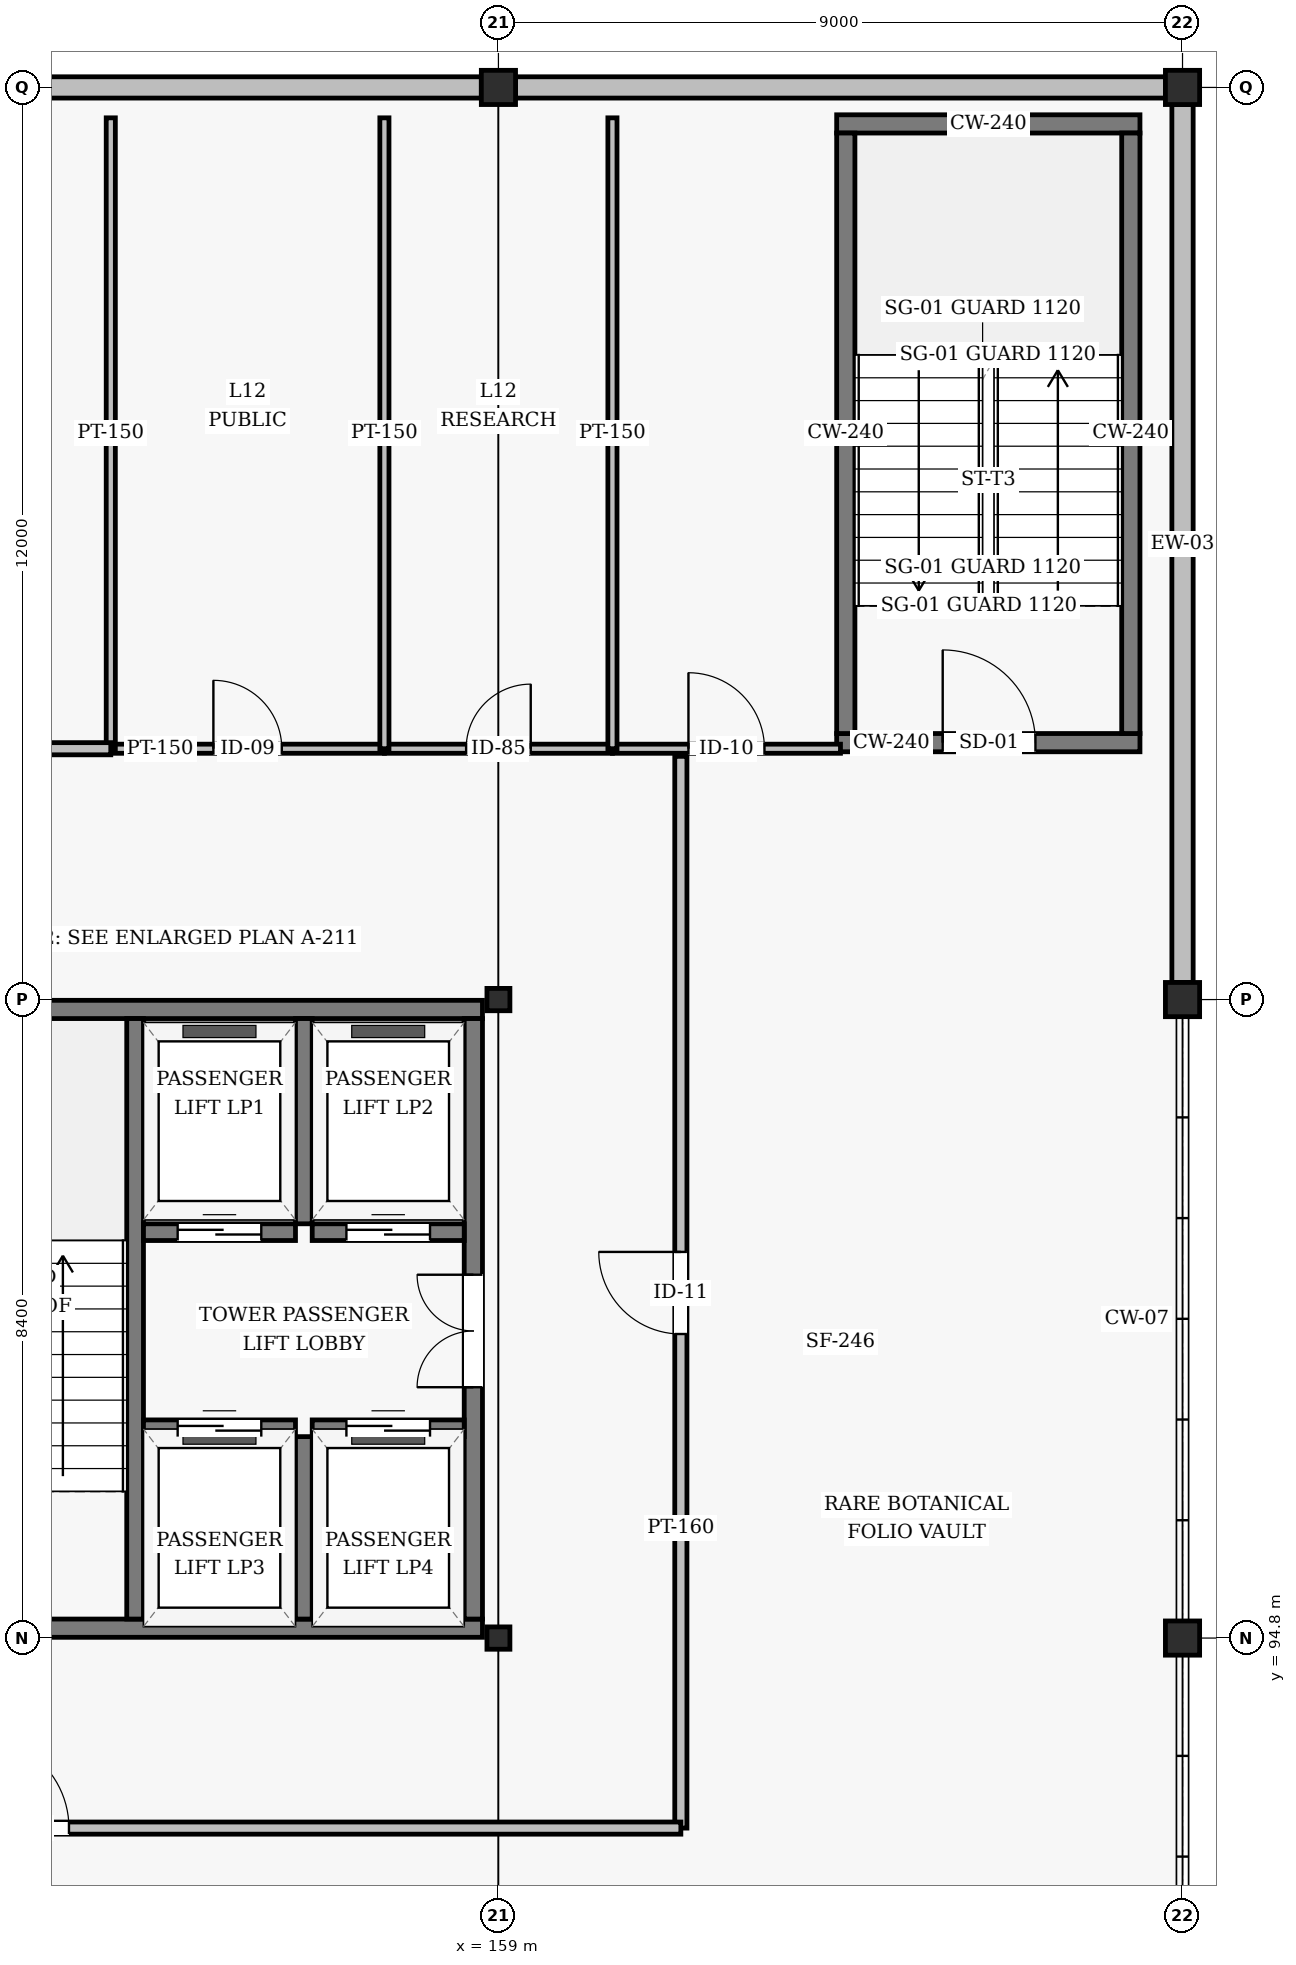
"""IFC4 building model, lengths in metres.
Left out: names, types, materials, properties, quantities, classifications, styles, units other than length and angle.
Written with IfcOpenShell. Run it as: python <this file> out.ifc"""

import sys

from ifc_helpers import new_model, si_unit, direction, frame, frame_2d, origin, origin_2d, place, context, subcontext, project, spatial, rectangle, hollow_rectangle, i_section, extrude, element, fill, save


model = new_model("IFC4")
c1 = context("Model", 3, precision=1e-05, world=origin(), true_north=direction((0.0, 1.0)))
c2 = subcontext(c1, "Body", "Model", "MODEL_VIEW")
j1 = project(units=[si_unit("LENGTHUNIT", "METRE"), si_unit("PLANEANGLEUNIT", "RADIAN")], contexts=[c1])
p1 = place(None, origin())
s1 = spatial("IfcSite", under=j1, at=p1, CompositionType="ELEMENT")
p2 = place(p1, origin())
s2 = spatial("IfcBuilding", under=s1, at=p2, CompositionType="ELEMENT")
p3 = place(p2, frame((0.0, 0.0, 46.8)))
s3 = spatial("IfcBuildingStorey", under=s2, at=p3, CompositionType="ELEMENT", Elevation=46.8)
for number, where, z_axis, x_axis in (
    (1, (159.0, 94.8, 0.0), (0.0, 0.0, 1.0), (1.0, 0.0, 0.0)),
    (2, (159.0, 103.2, 0.0), (0.0, 0.0, 1.0), (1.0, 0.0, 0.0)),
):
    element("IfcColumn", number, at=place(p3, frame(where, z_axis=z_axis, x_axis=x_axis)), inside=s3, PredefinedType="COLUMN", context=c2, shape_type="SweptSolid", body=[
        extrude(i_section(OverallWidth=0.302, OverallDepth=0.294, WebThickness=0.012, FlangeThickness=0.012, FilletRadius=0.018, at=origin_2d()), origin(), (0.0, 0.0, 1.0), 3.6),
    ])
for number, where, z_axis, x_axis in (
    (3, (159.0, 115.2, 0.0), (0.0, 0.0, 1.0), (1.0, 0.0, 0.0)),
    (4, (168.0, 94.8, 0.0), (0.0, 0.0, 1.0), (1.0, 0.0, 0.0)),
    (5, (168.0, 103.2, 0.0), (0.0, 0.0, 1.0), (1.0, 0.0, 0.0)),
    (6, (168.0, 115.2, 0.0), (0.0, 0.0, 1.0), (1.0, 0.0, 0.0)),
):
    element("IfcColumn", number, at=place(p3, frame(where, z_axis=z_axis, x_axis=x_axis)), inside=s3, PredefinedType="COLUMN", context=c2, shape_type="SweptSolid", body=[
        extrude(hollow_rectangle(XDim=0.45, YDim=0.45, WallThickness=0.018, InnerFilletRadius=0.018, OuterFilletRadius=0.036, at=origin_2d()), origin(), (0.0, 0.0, 1.0), 3.6),
    ])
p4 = place(p3, frame((168.0, 103.425, 0.0), z_axis=(0.0, 0.0, 1.0), x_axis=(0.0, 1.0, 0.0)))
e7 = element("IfcWall", 7, at=p4, inside=s3, PredefinedType="SOLIDWALL", context=c2, shape_type="SweptSolid", body=[
    extrude(rectangle(XDim=11.55, YDim=0.28, at=frame_2d((5.775, 0.0))), origin(), (0.0, 0.0, 1.0), 2.546),
])
for number, where, z_axis, x_axis in (
    (8, (167.775, 115.2, 0.0), (0.0, 0.0, 1.0), (-1.0, 0.0, 0.0)),
    (9, (158.775, 115.2, 0.0), (0.0, 0.0, 1.0), (-1.0, 0.0, 0.0)),
):
    element("IfcWall", number, at=place(p3, frame(where, z_axis=z_axis, x_axis=x_axis)), inside=s3, PredefinedType="SOLIDWALL", context=c2, shape_type="SweptSolid", body=[
        extrude(rectangle(XDim=8.55, YDim=0.28, at=frame_2d((4.275, 0.0))), origin(), (0.0, 0.0, 1.0), 2.546),
    ])
p5 = place(p3, frame((150.02, 94.93, 0.0), z_axis=(0.0, 0.0, 1.0), x_axis=(1.0, 0.0, 0.0)))
e10 = element("IfcWall", 10, at=p5, inside=s3, PredefinedType="SHEAR", context=c2, shape_type="SweptSolid", body=[
    extrude(rectangle(XDim=8.77, YDim=0.24, at=frame_2d((4.385, 0.0))), origin(), (0.0, 0.0, 1.0), 3.338),
])
p6 = place(p5, frame((1.79, 0.0, 0.0)))
e11 = element("IfcOpeningElement", 11, at=p6, cuts=e10, PredefinedType="OPENING", context=c2, shape_type="SweptSolid", body=[
    extrude(rectangle(XDim=1.22, YDim=2.18, at=frame_2d((0.61, 1.09))), frame((0.0, 0.13, 0.0), z_axis=(0.0, -1.0, 0.0), x_axis=(1.0, 0.0, 0.0)), (0.0, 0.0, 1.0), 0.26),
])
p7 = place(p3, frame((150.02, 103.07, 0.0), z_axis=(0.0, 0.0, 1.0), x_axis=(1.0, 0.0, 0.0)))
e12 = element("IfcWall", 12, at=p7, inside=s3, PredefinedType="SHEAR", context=c2, shape_type="SweptSolid", body=[
    extrude(rectangle(XDim=8.77, YDim=0.24, at=frame_2d((4.385, 0.0))), origin(), (0.0, 0.0, 1.0), 3.338),
])
p8 = place(p3, frame((154.22, 95.05, 0.0), z_axis=(0.0, 0.0, 1.0), x_axis=(0.0, 1.0, 0.0)))
e13 = element("IfcWall", 13, at=p8, inside=s3, PredefinedType="SHEAR", context=c2, shape_type="SweptSolid", body=[
    extrude(rectangle(XDim=7.9, YDim=0.22, at=frame_2d((3.95, 0.0))), origin(), (0.0, 0.0, 1.0), 3.338),
])
p9 = place(p3, frame((158.67, 95.05, 0.0), z_axis=(0.0, 0.0, 1.0), x_axis=(0.0, 1.0, 0.0)))
e14 = element("IfcWall", 14, at=p9, inside=s3, PredefinedType="SHEAR", context=c2, shape_type="SweptSolid", body=[
    extrude(rectangle(XDim=7.9, YDim=0.24, at=frame_2d((3.95, 0.0))), origin(), (0.0, 0.0, 1.0), 3.338),
])
p10 = place(p9, frame((3.05, 0.0, 0.0)))
e15 = element("IfcOpeningElement", 15, at=p10, cuts=e14, PredefinedType="OPENING", context=c2, shape_type="SweptSolid", body=[
    extrude(rectangle(XDim=1.48, YDim=2.22, at=frame_2d((0.74, 1.11))), frame((0.0, 0.13, 0.0), z_axis=(0.0, -1.0, 0.0), x_axis=(1.0, 0.0, 0.0)), (0.0, 0.0, 1.0), 0.26),
])
p11 = place(p3, frame((156.44, 100.25, 0.0), z_axis=(0.0, 0.0, 1.0), x_axis=(0.0, 1.0, 0.0)))
e16 = element("IfcWall", 16, at=p11, inside=s3, PredefinedType="SHEAR", context=c2, shape_type="SweptSolid", body=[
    extrude(rectangle(XDim=2.7, YDim=0.22, at=frame_2d((1.35, 0.0))), origin(), (0.0, 0.0, 1.0), 3.338),
])
p12 = place(p3, frame((154.33, 100.14, 0.0), z_axis=(0.0, 0.0, 1.0), x_axis=(1.0, 0.0, 0.0)))
e17 = element("IfcWall", 17, at=p12, inside=s3, PredefinedType="SHEAR", context=c2, shape_type="SweptSolid", body=[
    extrude(rectangle(XDim=2.0, YDim=0.22, at=frame_2d((1.0, 0.0))), origin(), (0.0, 0.0, 1.0), 3.338),
])
p13 = place(p12, frame((0.45, 0.0, 0.0)))
e18 = element("IfcOpeningElement", 18, at=p13, cuts=e17, PredefinedType="OPENING", context=c2, shape_type="SweptSolid", body=[
    extrude(rectangle(XDim=1.1, YDim=2.15, at=frame_2d((0.55, 1.075))), frame((0.0, 0.12, 0.0), z_axis=(0.0, -1.0, 0.0), x_axis=(1.0, 0.0, 0.0)), (0.0, 0.0, 1.0), 0.24),
])
p14 = place(p3, frame((156.55, 100.14, 0.0), z_axis=(0.0, 0.0, 1.0), x_axis=(1.0, 0.0, 0.0)))
e19 = element("IfcWall", 19, at=p14, inside=s3, PredefinedType="SHEAR", context=c2, shape_type="SweptSolid", body=[
    extrude(rectangle(XDim=2.0, YDim=0.22, at=frame_2d((1.0, 0.0))), origin(), (0.0, 0.0, 1.0), 3.338),
])
p15 = place(p14, frame((0.45, 0.0, 0.0)))
e20 = element("IfcOpeningElement", 20, at=p15, cuts=e19, PredefinedType="OPENING", context=c2, shape_type="SweptSolid", body=[
    extrude(rectangle(XDim=1.1, YDim=2.15, at=frame_2d((0.55, 1.075))), frame((0.0, 0.12, 0.0), z_axis=(0.0, -1.0, 0.0), x_axis=(1.0, 0.0, 0.0)), (0.0, 0.0, 1.0), 0.24),
])
p16 = place(p3, frame((156.44, 95.05, 0.0), z_axis=(0.0, 0.0, 1.0), x_axis=(0.0, 1.0, 0.0)))
e21 = element("IfcWall", 21, at=p16, inside=s3, PredefinedType="SHEAR", context=c2, shape_type="SweptSolid", body=[
    extrude(rectangle(XDim=2.4, YDim=0.22, at=frame_2d((1.2, 0.0))), origin(), (0.0, 0.0, 1.0), 3.338),
])
p17 = place(p3, frame((154.33, 97.56, 0.0), z_axis=(0.0, 0.0, 1.0), x_axis=(1.0, 0.0, 0.0)))
e22 = element("IfcWall", 22, at=p17, inside=s3, PredefinedType="SHEAR", context=c2, shape_type="SweptSolid", body=[
    extrude(rectangle(XDim=2.0, YDim=0.22, at=frame_2d((1.0, 0.0))), origin(), (0.0, 0.0, 1.0), 3.338),
])
p18 = place(p17, frame((0.45, 0.0, 0.0)))
e23 = element("IfcOpeningElement", 23, at=p18, cuts=e22, PredefinedType="OPENING", context=c2, shape_type="SweptSolid", body=[
    extrude(rectangle(XDim=1.1, YDim=2.15, at=frame_2d((0.55, 1.075))), frame((0.0, 0.12, 0.0), z_axis=(0.0, -1.0, 0.0), x_axis=(1.0, 0.0, 0.0)), (0.0, 0.0, 1.0), 0.24),
])
p19 = place(p3, frame((156.55, 97.56, 0.0), z_axis=(0.0, 0.0, 1.0), x_axis=(1.0, 0.0, 0.0)))
e24 = element("IfcWall", 24, at=p19, inside=s3, PredefinedType="SHEAR", context=c2, shape_type="SweptSolid", body=[
    extrude(rectangle(XDim=2.0, YDim=0.22, at=frame_2d((1.0, 0.0))), origin(), (0.0, 0.0, 1.0), 3.338),
])
p20 = place(p19, frame((0.45, 0.0, 0.0)))
e25 = element("IfcOpeningElement", 25, at=p20, cuts=e24, PredefinedType="OPENING", context=c2, shape_type="SweptSolid", body=[
    extrude(rectangle(XDim=1.1, YDim=2.15, at=frame_2d((0.55, 1.075))), frame((0.0, 0.12, 0.0), z_axis=(0.0, -1.0, 0.0), x_axis=(1.0, 0.0, 0.0)), (0.0, 0.0, 1.0), 0.24),
])
p21 = place(p3, frame((163.45, 106.58, 0.0), z_axis=(0.0, 0.0, 1.0), x_axis=(1.0, 0.0, 0.0)))
e26 = element("IfcWall", 26, at=p21, inside=s3, PredefinedType="SHEAR", context=c2, shape_type="SweptSolid", body=[
    extrude(rectangle(XDim=3.99, YDim=0.24, at=frame_2d((1.995, 0.0))), origin(), (0.0, 0.0, 1.0), 3.338),
])
p22 = place(p21, frame((1.395, 0.0, 0.0)))
e27 = element("IfcOpeningElement", 27, at=p22, cuts=e26, PredefinedType="OPENING", context=c2, shape_type="SweptSolid", body=[
    extrude(rectangle(XDim=1.22, YDim=2.18, at=frame_2d((0.61, 1.09))), frame((0.0, 0.13, 0.0), z_axis=(0.0, -1.0, 0.0), x_axis=(1.0, 0.0, 0.0)), (0.0, 0.0, 1.0), 0.26),
])
p23 = place(p3, frame((163.45, 114.72, 0.0), z_axis=(0.0, 0.0, 1.0), x_axis=(1.0, 0.0, 0.0)))
e28 = element("IfcWall", 28, at=p23, inside=s3, PredefinedType="SHEAR", context=c2, shape_type="SweptSolid", body=[
    extrude(rectangle(XDim=3.99, YDim=0.24, at=frame_2d((1.995, 0.0))), origin(), (0.0, 0.0, 1.0), 3.338),
])
for number, where, z_axis, x_axis in (
    (29, (163.57, 106.7, 0.0), (0.0, 0.0, 1.0), (0.0, 1.0, 0.0)),
    (30, (167.32, 106.7, 0.0), (0.0, 0.0, 1.0), (0.0, 1.0, 0.0)),
):
    element("IfcWall", number, at=place(p3, frame(where, z_axis=z_axis, x_axis=x_axis)), inside=s3, PredefinedType="SHEAR", context=c2, shape_type="SweptSolid", body=[
        extrude(rectangle(XDim=7.9, YDim=0.24, at=frame_2d((3.95, 0.0))), origin(), (0.0, 0.0, 1.0), 3.338),
    ])
p24 = place(p3, frame((153.9, 106.5, 0.0), z_axis=(0.0, 0.0, 1.0), x_axis=(1.0, 0.0, 0.0)))
e31 = element("IfcWall", 31, at=p24, inside=s3, PredefinedType="PARTITIONING", context=c2, shape_type="SweptSolid", body=[
    extrude(rectangle(XDim=3.6, YDim=0.12, at=frame_2d((1.8, 0.0))), origin(), (0.0, 0.0, 1.0), 3.338),
])
p25 = place(p24, frame((1.35, 0.0, 0.0)))
e32 = element("IfcOpeningElement", 32, at=p25, cuts=e31, PredefinedType="OPENING", context=c2, shape_type="SweptSolid", body=[
    extrude(rectangle(XDim=0.9, YDim=2.1, at=frame_2d((0.45, 1.05))), frame((0.0, 0.07, 0.0), z_axis=(0.0, -1.0, 0.0), x_axis=(1.0, 0.0, 0.0)), (0.0, 0.0, 1.0), 0.14),
])
p26 = place(p3, frame((157.5, 106.5, 0.0), z_axis=(0.0, 0.0, 1.0), x_axis=(1.0, 0.0, 0.0)))
e33 = element("IfcWall", 33, at=p26, inside=s3, PredefinedType="PARTITIONING", context=c2, shape_type="SweptSolid", body=[
    extrude(rectangle(XDim=3.0, YDim=0.12, at=frame_2d((1.5, 0.0))), origin(), (0.0, 0.0, 1.0), 2.588),
])
p27 = place(p26, frame((1.075, 0.0, 0.0)))
e34 = element("IfcOpeningElement", 34, at=p27, cuts=e33, PredefinedType="OPENING", context=c2, shape_type="SweptSolid", body=[
    extrude(rectangle(XDim=0.85, YDim=2.1, at=frame_2d((0.425, 1.05))), frame((0.0, 0.07, 0.0), z_axis=(0.0, -1.0, 0.0), x_axis=(1.0, 0.0, 0.0)), (0.0, 0.0, 1.0), 0.14),
])
p28 = place(p3, frame((160.5, 106.5, 0.0), z_axis=(0.0, 0.0, 1.0), x_axis=(1.0, 0.0, 0.0)))
e35 = element("IfcWall", 35, at=p28, inside=s3, PredefinedType="PARTITIONING", context=c2, shape_type="SweptSolid", body=[
    extrude(rectangle(XDim=3.0, YDim=0.12, at=frame_2d((1.5, 0.0))), origin(), (0.0, 0.0, 1.0), 3.338),
])
p29 = place(p28, frame((1.0, 0.0, 0.0)))
e36 = element("IfcOpeningElement", 36, at=p29, cuts=e35, PredefinedType="OPENING", context=c2, shape_type="SweptSolid", body=[
    extrude(rectangle(XDim=1.0, YDim=2.1, at=frame_2d((0.5, 1.05))), frame((0.0, 0.07, 0.0), z_axis=(0.0, -1.0, 0.0), x_axis=(1.0, 0.0, 0.0)), (0.0, 0.0, 1.0), 0.14),
])
for number, where, z_axis, x_axis in (
    (37, (153.9, 106.5, 0.0), (0.0, 0.0, 1.0), (0.0, 1.0, 0.0)),
    (38, (157.5, 106.5, 0.0), (0.0, 0.0, 1.0), (0.0, 1.0, 0.0)),
):
    element("IfcWall", number, at=place(p3, frame(where, z_axis=z_axis, x_axis=x_axis)), inside=s3, PredefinedType="PARTITIONING", context=c2, shape_type="SweptSolid", body=[
        extrude(rectangle(XDim=8.3, YDim=0.12, at=frame_2d((4.15, 0.0))), origin(), (0.0, 0.0, 1.0), 2.938),
    ])
p30 = place(p3, frame((160.5, 106.5, 0.0), z_axis=(0.0, 0.0, 1.0), x_axis=(0.0, 1.0, 0.0)))
e39 = element("IfcWall", 39, at=p30, inside=s3, PredefinedType="PARTITIONING", context=c2, shape_type="SweptSolid", body=[
    extrude(rectangle(XDim=8.3, YDim=0.12, at=frame_2d((4.15, 0.0))), origin(), (0.0, 0.0, 1.0), 3.338),
])
p31 = place(p3, frame((161.4, 92.3, 0.0), z_axis=(0.0, 0.0, 1.0), x_axis=(0.0, 1.0, 0.0)))
e40 = element("IfcWall", 40, at=p31, inside=s3, PredefinedType="PARTITIONING", context=c2, shape_type="SweptSolid", body=[
    extrude(rectangle(XDim=14.1, YDim=0.16, at=frame_2d((7.05, 0.0))), origin(), (0.0, 0.0, 1.0), 2.742),
])
p32 = place(p31, frame((6.5, 0.0, 0.0)))
e41 = element("IfcOpeningElement", 41, at=p32, cuts=e40, PredefinedType="OPENING", context=c2, shape_type="SweptSolid", body=[
    extrude(rectangle(XDim=1.08, YDim=2.08, at=frame_2d((0.54, 1.04))), frame((0.0, 0.09, 0.0), z_axis=(0.0, -1.0, 0.0), x_axis=(1.0, 0.0, 0.0)), (0.0, 0.0, 1.0), 0.18),
])
p33 = place(p3, frame((144.1, 92.3, 0.0), z_axis=(0.0, 0.0, 1.0), x_axis=(1.0, 0.0, 0.0)))
e42 = element("IfcWall", 42, at=p33, inside=s3, PredefinedType="PARTITIONING", context=c2, shape_type="SweptSolid", body=[
    extrude(rectangle(XDim=17.3, YDim=0.16, at=frame_2d((8.65, 0.0))), origin(), (0.0, 0.0, 1.0), 2.838),
])
p34 = place(p33, frame((8.05, 0.0, 0.0)))
e43 = element("IfcOpeningElement", 43, at=p34, cuts=e42, PredefinedType="OPENING", context=c2, shape_type="SweptSolid", body=[
    extrude(rectangle(XDim=1.2, YDim=2.08, at=frame_2d((0.6, 1.04))), frame((0.0, 0.09, 0.0), z_axis=(0.0, -1.0, 0.0), x_axis=(1.0, 0.0, 0.0)), (0.0, 0.0, 1.0), 0.18),
])
p35 = place(p3, frame((125.0, 106.5, 0.0), z_axis=(0.0, 0.0, 1.0), x_axis=(1.0, 0.0, 0.0)))
e44 = element("IfcWall", 44, at=p35, inside=s3, PredefinedType="PARTITIONING", context=c2, shape_type="SweptSolid", body=[
    extrude(rectangle(XDim=28.9, YDim=0.16, at=frame_2d((14.45, 0.0))), origin(), (0.0, 0.0, 1.0), 2.588),
])
p36 = place(p35, frame((13.85, 0.0, 0.0)))
e45 = element("IfcOpeningElement", 45, at=p36, cuts=e44, PredefinedType="OPENING", context=c2, shape_type="SweptSolid", body=[
    extrude(rectangle(XDim=1.2, YDim=2.08, at=frame_2d((0.6, 1.04))), frame((0.0, 0.09, 0.0), z_axis=(0.0, -1.0, 0.0), x_axis=(1.0, 0.0, 0.0)), (0.0, 0.0, 1.0), 0.18),
])
p37 = place(p10, origin())
e46 = element("IfcDoor", 46, at=p37, inside=s3, OperationType="DOUBLE_DOOR_SINGLE_SWING", PredefinedType="DOOR", context=c2, shape_type="SweptSolid", body=[
    extrude(rectangle(XDim=1.48, YDim=2.22, at=frame_2d((0.74, 1.11))), frame((0.0, 0.025, 0.0), z_axis=(0.0, -1.0, 0.0), x_axis=(1.0, 0.0, 0.0)), (0.0, 0.0, 1.0), 0.05),
])
fill(e15, e46)
p38 = place(p13, origin())
e47 = element("IfcDoor", 47, at=p38, inside=s3, OperationType="SLIDING_TO_LEFT", PredefinedType="DOOR", context=c2, shape_type="SweptSolid", body=[
    extrude(rectangle(XDim=1.1, YDim=2.15, at=frame_2d((0.55, 1.075))), frame((0.0, 0.025, 0.0), z_axis=(0.0, -1.0, 0.0), x_axis=(1.0, 0.0, 0.0)), (0.0, 0.0, 1.0), 0.05),
])
fill(e18, e47)
p39 = place(p15, origin())
e48 = element("IfcDoor", 48, at=p39, inside=s3, OperationType="SLIDING_TO_LEFT", PredefinedType="DOOR", context=c2, shape_type="SweptSolid", body=[
    extrude(rectangle(XDim=1.1, YDim=2.15, at=frame_2d((0.55, 1.075))), frame((0.0, 0.025, 0.0), z_axis=(0.0, -1.0, 0.0), x_axis=(1.0, 0.0, 0.0)), (0.0, 0.0, 1.0), 0.05),
])
fill(e20, e48)
p40 = place(p18, origin())
e49 = element("IfcDoor", 49, at=p40, inside=s3, OperationType="SLIDING_TO_LEFT", PredefinedType="DOOR", context=c2, shape_type="SweptSolid", body=[
    extrude(rectangle(XDim=1.1, YDim=2.15, at=frame_2d((0.55, 1.075))), frame((0.0, 0.025, 0.0), z_axis=(0.0, -1.0, 0.0), x_axis=(1.0, 0.0, 0.0)), (0.0, 0.0, 1.0), 0.05),
])
fill(e23, e49)
p41 = place(p20, origin())
e50 = element("IfcDoor", 50, at=p41, inside=s3, OperationType="SLIDING_TO_LEFT", PredefinedType="DOOR", context=c2, shape_type="SweptSolid", body=[
    extrude(rectangle(XDim=1.1, YDim=2.15, at=frame_2d((0.55, 1.075))), frame((0.0, 0.025, 0.0), z_axis=(0.0, -1.0, 0.0), x_axis=(1.0, 0.0, 0.0)), (0.0, 0.0, 1.0), 0.05),
])
fill(e25, e50)
p42 = place(p22, origin())
e51 = element("IfcDoor", 51, at=p42, inside=s3, OperationType="SINGLE_SWING_LEFT", PredefinedType="DOOR", context=c2, shape_type="SweptSolid", body=[
    extrude(rectangle(XDim=1.22, YDim=2.18, at=frame_2d((0.61, 1.09))), frame((0.0, 0.025, 0.0), z_axis=(0.0, -1.0, 0.0), x_axis=(1.0, 0.0, 0.0)), (0.0, 0.0, 1.0), 0.05),
])
fill(e27, e51)
p43 = place(p25, origin())
e52 = element("IfcDoor", 52, at=p43, inside=s3, OperationType="SINGLE_SWING_LEFT", PredefinedType="DOOR", context=c2, shape_type="SweptSolid", body=[
    extrude(rectangle(XDim=0.9, YDim=2.1, at=frame_2d((0.45, 1.05))), frame((0.0, 0.025, 0.0), z_axis=(0.0, -1.0, 0.0), x_axis=(1.0, 0.0, 0.0)), (0.0, 0.0, 1.0), 0.05),
])
fill(e32, e52)
p44 = place(p27, origin())
e53 = element("IfcDoor", 53, at=p44, inside=s3, OperationType="SINGLE_SWING_RIGHT", PredefinedType="DOOR", context=c2, shape_type="SweptSolid", body=[
    extrude(rectangle(XDim=0.85, YDim=2.1, at=frame_2d((0.425, 1.05))), frame((0.0, 0.025, 0.0), z_axis=(0.0, -1.0, 0.0), x_axis=(1.0, 0.0, 0.0)), (0.0, 0.0, 1.0), 0.05),
])
fill(e34, e53)
p45 = place(p29, origin())
e54 = element("IfcDoor", 54, at=p45, inside=s3, OperationType="SINGLE_SWING_LEFT", PredefinedType="DOOR", context=c2, shape_type="SweptSolid", body=[
    extrude(rectangle(XDim=1.0, YDim=2.1, at=frame_2d((0.5, 1.05))), frame((0.0, 0.025, 0.0), z_axis=(0.0, -1.0, 0.0), x_axis=(1.0, 0.0, 0.0)), (0.0, 0.0, 1.0), 0.05),
])
fill(e36, e54)
p46 = place(p32, origin())
e55 = element("IfcDoor", 55, at=p46, inside=s3, OperationType="SINGLE_SWING_RIGHT", PredefinedType="DOOR", context=c2, shape_type="SweptSolid", body=[
    extrude(rectangle(XDim=1.08, YDim=2.08, at=frame_2d((0.54, 1.04))), frame((0.0, 0.025, 0.0), z_axis=(0.0, -1.0, 0.0), x_axis=(1.0, 0.0, 0.0)), (0.0, 0.0, 1.0), 0.05),
])
fill(e41, e55)
p47 = place(p34, origin())
e56 = element("IfcDoor", 56, at=p47, inside=s3, OperationType="SINGLE_SWING_LEFT", PredefinedType="DOOR", context=c2, shape_type="SweptSolid", body=[
    extrude(rectangle(XDim=1.2, YDim=2.08, at=frame_2d((0.6, 1.04))), frame((0.0, 0.025, 0.0), z_axis=(0.0, -1.0, 0.0), x_axis=(1.0, 0.0, 0.0)), (0.0, 0.0, 1.0), 0.05),
])
fill(e43, e56)
save(model, sys.argv[1])
